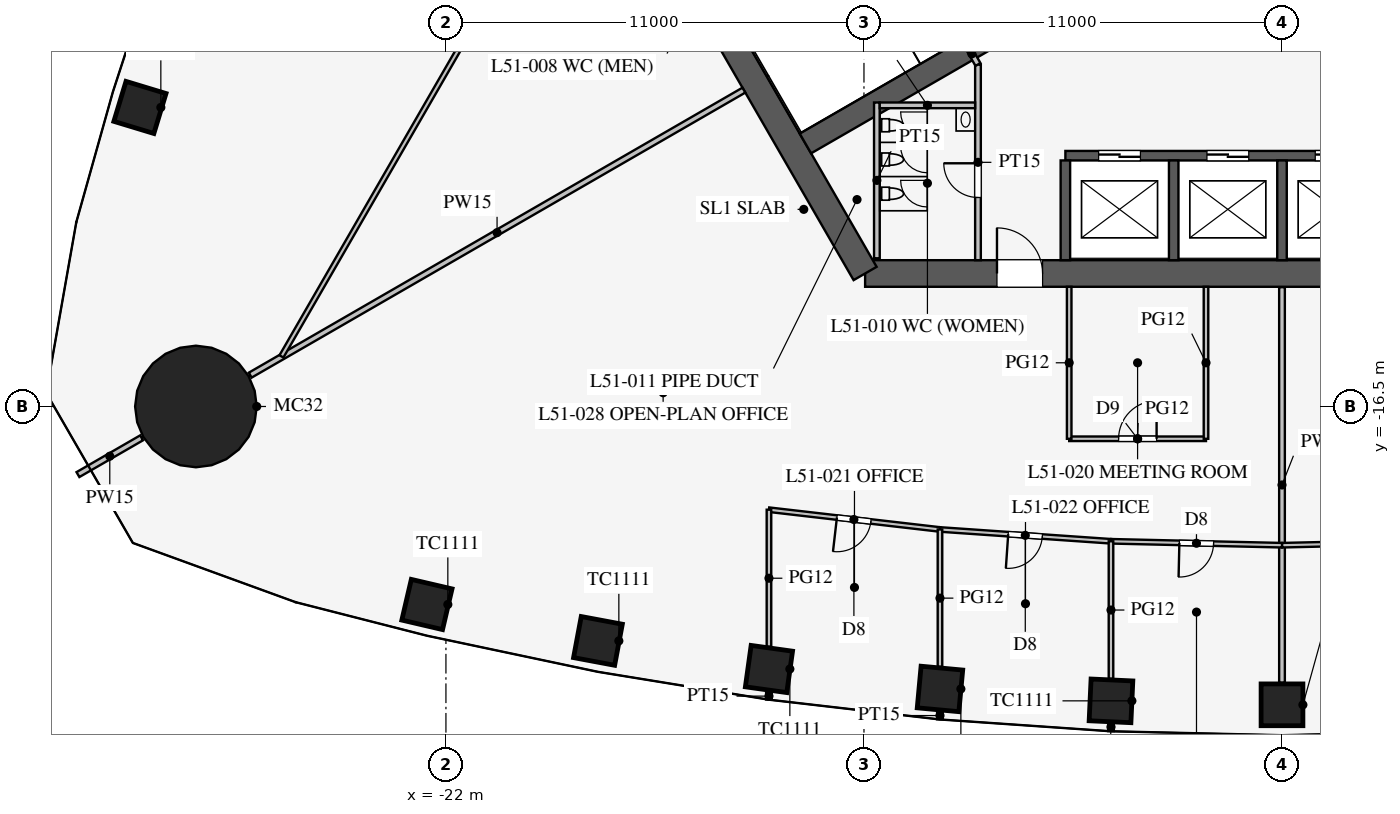
"""IFC4 building model, lengths in metres.
Left out: names, types, materials, properties, quantities, classifications, styles, units other than length and angle.
Written with IfcOpenShell. Run it as: python <this file> out.ifc"""

import sys

from ifc_helpers import new_model, si_unit, direction, frame, frame_2d, origin, origin_2d, place, context, subcontext, project, spatial, rectangle, circle, extrude, element, fill, save


model = new_model("IFC4")
c1 = context("Model", 3, precision=1e-05, world=origin(), true_north=direction((0.0, 1.0)))
c2 = subcontext(c1, "Body", "Model", "MODEL_VIEW")
j1 = project(units=[si_unit("LENGTHUNIT", "METRE"), si_unit("PLANEANGLEUNIT", "RADIAN")], contexts=[c1])
p1 = place(None, origin())
s1 = spatial("IfcSite", under=j1, at=p1, CompositionType="ELEMENT")
p2 = place(p1, origin())
s2 = spatial("IfcBuilding", under=s1, at=p2, CompositionType="ELEMENT")
p3 = place(p2, frame((0.0, 0.0, 223.3)))
s3 = spatial("IfcBuildingStorey", under=s2, at=p3, CompositionType="ELEMENT", Elevation=223.3)
for number, where, z_axis, x_axis in (
    (1, (-22.5, -21.71, 0.0), (0.0, 0.0, 1.0), (0.974, -0.227, 0.0)),
    (2, (-18.0, -22.669, 0.0), (0.0, 0.0, 1.0), (0.983, -0.184, 0.0)),
    (3, (-13.5, -23.408, 0.0), (0.0, 0.0, 1.0), (0.99, -0.138, 0.0)),
    (4, (-9.0, -23.933, 0.0), (0.0, 0.0, 1.0), (0.996, -0.092, 0.0)),
    (5, (-4.5, -24.246, 0.0), (0.0, 0.0, 1.0), (0.999, -0.046, 0.0)),
    (6, (0.0, -24.351, 0.0), (0.0, 0.0, 1.0), (1.0, 0.0, 0.0)),
    (7, (-30.052, -8.63, 0.0), (0.0, 0.0, 1.0), (-0.29, -0.957, 0.0)),
):
    element("IfcColumn", number, at=place(p3, frame(where, z_axis=z_axis, x_axis=x_axis)), inside=s3, PredefinedType="COLUMN", context=c2, shape_type="SweptSolid", body=[
        extrude(rectangle(XDim=1.1, YDim=1.1, at=origin_2d()), origin(), (0.0, 0.0, 1.0), 4.2),
    ])
p4 = place(p3, frame((-28.579, -16.5, 0.0), z_axis=(0.0, 0.0, 1.0), x_axis=(1.0, 0.0, 0.0)))
e8 = element("IfcColumn", 8, at=p4, inside=s3, PredefinedType="COLUMN", context=c2, shape_type="SweptSolid", body=[
    extrude(circle(Radius=1.6, at=origin_2d()), origin(), (0.0, 0.0, 1.0), 4.2),
])
p5 = place(p3, frame((-10.97, -13.0, 0.0), z_axis=(0.0, 0.0, 1.0), x_axis=(1.0, 0.0, 0.0)))
e9 = element("IfcWall", 9, at=p5, inside=s3, PredefinedType="SHEAR", context=c2, shape_type="SweptSolid", body=[
    extrude(rectangle(XDim=21.939, YDim=0.7, at=frame_2d((10.97, 0.0))), origin(), (0.0, 0.0, 1.0), 4.2),
])
p6 = place(p5, frame((17.27, 0.0, 0.0)))
e10 = element("IfcOpeningElement", 10, at=p6, cuts=e9, PredefinedType="OPENING", context=c2, shape_type="SweptSolid", body=[
    extrude(rectangle(XDim=1.2, YDim=2.1, at=frame_2d((0.6, 1.05))), frame((0.0, 0.36, 0.0), z_axis=(0.0, -1.0, 0.0), x_axis=(1.0, 0.0, 0.0)), (0.0, 0.0, 1.0), 0.72),
])
p7 = place(p5, frame((3.47, 0.0, 0.0)))
e11 = element("IfcOpeningElement", 11, at=p7, cuts=e9, PredefinedType="OPENING", context=c2, shape_type="SweptSolid", body=[
    extrude(rectangle(XDim=1.2, YDim=2.1, at=frame_2d((0.6, 1.05))), frame((0.0, 0.36, 0.0), z_axis=(0.0, -1.0, 0.0), x_axis=(1.0, 0.0, 0.0)), (0.0, 0.0, 1.0), 0.72),
])
p8 = place(p3, frame((-16.743, -3.0, 0.0), z_axis=(0.0, 0.0, 1.0), x_axis=(0.499995765644, -0.866027848477, 0.0)))
e12 = element("IfcWall", 12, at=p8, inside=s3, PredefinedType="SHEAR", context=c2, shape_type="SweptSolid", body=[
    extrude(rectangle(XDim=11.547, YDim=0.7, at=frame_2d((5.773, 0.0))), origin(), (0.0, 0.0, 1.0), 4.2),
])
p9 = place(p3, frame((-5.7, -9.9, 0.0), z_axis=(0.0, 0.0, 1.0), x_axis=(1.0, 0.0, 0.0)))
e13 = element("IfcWall", 13, at=p9, inside=s3, PredefinedType="SHEAR", context=c2, shape_type="SweptSolid", body=[
    extrude(rectangle(XDim=11.4, YDim=0.25, at=frame_2d((5.7, 0.0))), origin(), (0.0, 0.0, 1.0), 4.2),
])
p10 = place(p9, frame((0.875, 0.0, 0.0)))
e14 = element("IfcOpeningElement", 14, at=p10, cuts=e13, PredefinedType="OPENING", context=c2, shape_type="SweptSolid", body=[
    extrude(rectangle(XDim=1.1, YDim=2.2, at=frame_2d((0.55, 1.1))), frame((0.0, 0.135, 0.0), z_axis=(0.0, -1.0, 0.0), x_axis=(1.0, 0.0, 0.0)), (0.0, 0.0, 1.0), 0.27),
])
p11 = place(p9, frame((3.725, 0.0, 0.0)))
e15 = element("IfcOpeningElement", 15, at=p11, cuts=e13, PredefinedType="OPENING", context=c2, shape_type="SweptSolid", body=[
    extrude(rectangle(XDim=1.1, YDim=2.2, at=frame_2d((0.55, 1.1))), frame((0.0, 0.135, 0.0), z_axis=(0.0, -1.0, 0.0), x_axis=(1.0, 0.0, 0.0)), (0.0, 0.0, 1.0), 0.27),
])
p12 = place(p9, frame((6.575, 0.0, 0.0)))
e16 = element("IfcOpeningElement", 16, at=p12, cuts=e13, PredefinedType="OPENING", context=c2, shape_type="SweptSolid", body=[
    extrude(rectangle(XDim=1.1, YDim=2.2, at=frame_2d((0.55, 1.1))), frame((0.0, 0.135, 0.0), z_axis=(0.0, -1.0, 0.0), x_axis=(1.0, 0.0, 0.0)), (0.0, 0.0, 1.0), 0.27),
])
p13 = place(p9, frame((9.425, 0.0, 0.0)))
e17 = element("IfcOpeningElement", 17, at=p13, cuts=e13, PredefinedType="OPENING", context=c2, shape_type="SweptSolid", body=[
    extrude(rectangle(XDim=1.1, YDim=2.2, at=frame_2d((0.55, 1.1))), frame((0.0, 0.135, 0.0), z_axis=(0.0, -1.0, 0.0), x_axis=(1.0, 0.0, 0.0)), (0.0, 0.0, 1.0), 0.27),
])
for number, where, z_axis, x_axis in (
    (18, (-5.7, -10.025, 0.0), (0.0, 0.0, 1.0), (0.0, -1.0, 0.0)),
    (19, (-2.85, -10.025, 0.0), (0.0, 0.0, 1.0), (0.0, -1.0, 0.0)),
    (20, (0.0, -10.025, 0.0), (0.0, 0.0, 1.0), (0.0, -1.0, 0.0)),
):
    element("IfcWall", number, at=place(p3, frame(where, z_axis=z_axis, x_axis=x_axis)), inside=s3, PredefinedType="SHEAR", context=c2, shape_type="SweptSolid", body=[
        extrude(rectangle(XDim=2.625, YDim=0.25, at=frame_2d((1.312, 0.0))), origin(), (0.0, 0.0, 1.0), 4.2),
    ])
p14 = place(p3, frame((-4.638, -5.016, 0.0), z_axis=(0.0, 0.0, 1.0), x_axis=(-0.866021621257, -0.500006551472, 0.0)))
e21 = element("IfcWall", 21, at=p14, inside=s3, PredefinedType="SHEAR", context=c2, shape_type="SweptSolid", body=[
    extrude(rectangle(XDim=9.125, YDim=0.6, at=frame_2d((4.562, 0.0))), origin(), (0.0, 0.0, 1.0), 4.2),
])
p15 = place(p3, frame((-8.0, -7.5, 0.0), z_axis=(0.0, 0.0, 1.0), x_axis=(0.0, -1.0, 0.0)))
e22 = element("IfcWall", 22, at=p15, inside=s3, PredefinedType="PARTITIONING", context=c2, shape_type="SweptSolid", body=[
    extrude(rectangle(XDim=5.15, YDim=0.15, at=frame_2d((2.575, 0.0))), origin(), (0.0, 0.0, 1.0), 4.0),
])
p16 = place(p15, frame((2.6, 0.0, 0.0)))
e23 = element("IfcOpeningElement", 23, at=p16, cuts=e22, PredefinedType="OPENING", context=c2, shape_type="SweptSolid", body=[
    extrude(rectangle(XDim=0.9, YDim=2.1, at=frame_2d((0.45, 1.05))), frame((0.0, 0.085, 0.0), z_axis=(0.0, -1.0, 0.0), x_axis=(1.0, 0.0, 0.0)), (0.0, 0.0, 1.0), 0.17),
])
p17 = place(p3, frame((-8.0, -7.5, 0.0), z_axis=(0.0, 0.0, 1.0), x_axis=(-0.499842556608, 0.866116284689, 0.0)))
e24 = element("IfcWall", 24, at=p17, inside=s3, PredefinedType="PARTITIONING", context=c2, shape_type="SweptSolid", body=[
    extrude(rectangle(XDim=0.645, YDim=0.15, at=frame_2d((0.323, 0.0))), origin(), (0.0, 0.0, 1.0), 4.0),
])
p18 = place(p3, frame((-10.66, -8.5, 0.0), z_axis=(0.0, 0.0, 1.0), x_axis=(0.0, -1.0, 0.0)))
e25 = element("IfcWall", 25, at=p18, inside=s3, PredefinedType="PARTITIONING", context=c2, shape_type="SweptSolid", body=[
    extrude(rectangle(XDim=4.1, YDim=0.15, at=frame_2d((2.05, 0.0))), origin(), (0.0, 0.0, 1.0), 4.0),
])
p19 = place(p3, frame((-8.075, -8.575, 0.0), z_axis=(0.0, 0.0, 1.0), x_axis=(-1.0, 0.0, 0.0)))
e26 = element("IfcWall", 26, at=p19, inside=s3, PredefinedType="PARTITIONING", context=c2, shape_type="SweptSolid", body=[
    extrude(rectangle(XDim=2.51, YDim=0.15, at=frame_2d((1.255, 0.0))), origin(), (0.0, 0.0, 1.0), 4.0),
])
p20 = place(p3, frame((-14.159, -8.175, 0.0), z_axis=(0.0, 0.0, 1.0), x_axis=(-0.866027028085, -0.499997186618, 0.0)))
e27 = element("IfcWall", 27, at=p20, inside=s3, PredefinedType="PARTITIONING", context=c2, shape_type="SweptSolid", body=[
    extrude(rectangle(XDim=15.0, YDim=0.15, at=frame_2d((7.5, 0.0))), origin(), (0.0, 0.0, 1.0), 2.4),
])
p21 = place(p3, frame((-30.008, -17.325, 0.0), z_axis=(0.0, 0.0, 1.0), x_axis=(-0.866013246922, -0.500021055713, 0.0)))
e28 = element("IfcWall", 28, at=p21, inside=s3, PredefinedType="PARTITIONING", context=c2, shape_type="SweptSolid", body=[
    extrude(rectangle(XDim=1.935, YDim=0.15, at=frame_2d((0.967, 0.0))), origin(), (0.0, 0.0, 1.0), 2.4),
])
p22 = place(p3, frame((0.0, -13.36, 0.0), z_axis=(0.0, 0.0, 1.0), x_axis=(0.0, -1.0, 0.0)))
e29 = element("IfcWall", 29, at=p22, inside=s3, PredefinedType="PARTITIONING", context=c2, shape_type="SweptSolid", body=[
    extrude(rectangle(XDim=10.411, YDim=0.15, at=frame_2d((5.205, 0.0))), origin(), (0.0, 0.0, 1.0), 3.3),
])
p23 = place(p3, frame((-5.6, -17.35, 0.0), z_axis=(0.0, 0.0, 1.0), x_axis=(1.0, 0.0, 0.0)))
e30 = element("IfcWall", 30, at=p23, inside=s3, PredefinedType="PARTITIONING", context=c2, shape_type="SweptSolid", body=[
    extrude(rectangle(XDim=3.6, YDim=0.12, at=frame_2d((1.8, 0.0))), origin(), (0.0, 0.0, 1.0), 2.9),
])
p24 = place(p23, frame((1.3, 0.0, 0.15)))
e31 = element("IfcOpeningElement", 31, at=p24, cuts=e30, PredefinedType="OPENING", context=c2, shape_type="SweptSolid", body=[
    extrude(rectangle(XDim=1.0, YDim=2.1, at=frame_2d((0.5, 1.05))), frame((0.0, 0.07, 0.0), z_axis=(0.0, -1.0, 0.0), x_axis=(1.0, 0.0, 0.0)), (0.0, 0.0, 1.0), 0.14),
])
for number, where, z_axis, x_axis in (
    (32, (-2.0, -13.35, 0.0), (0.0, 0.0, 1.0), (0.0, -1.0, 0.0)),
    (33, (-5.6, -13.35, 0.0), (0.0, 0.0, 1.0), (0.0, -1.0, 0.0)),
):
    element("IfcWall", number, at=place(p3, frame(where, z_axis=z_axis, x_axis=x_axis)), inside=s3, PredefinedType="PARTITIONING", context=c2, shape_type="SweptSolid", body=[
        extrude(rectangle(XDim=4.0, YDim=0.12, at=frame_2d((2.0, 0.0))), origin(), (0.0, 0.0, 1.0), 2.9),
    ])
p25 = place(p3, frame((-13.5, -24.033, 0.0), z_axis=(0.0, 0.0, 1.0), x_axis=(0.0, -1.0, 0.0)))
e34 = element("IfcWall", 34, at=p25, inside=s3, PredefinedType="PARTITIONING", context=c2, shape_type="SweptSolid", body=[
    extrude(rectangle(XDim=0.178, YDim=0.15, at=frame_2d((0.089, 0.0))), origin(), (0.0, 0.0, 1.0), 2.9),
])
p26 = place(p3, frame((-4.5, -24.825, 0.0), z_axis=(0.0, 0.0, 1.0), x_axis=(0.0, -1.0, 0.0)))
e35 = element("IfcWall", 35, at=p26, inside=s3, PredefinedType="PARTITIONING", context=c2, shape_type="SweptSolid", body=[
    extrude(rectangle(XDim=0.217, YDim=0.15, at=frame_2d((0.108, 0.0))), origin(), (0.0, 0.0, 1.0), 2.9),
])
p27 = place(p3, frame((-9.0, -24.535, 0.0), z_axis=(0.0, 0.0, 1.0), x_axis=(0.0, -1.0, 0.0)))
e36 = element("IfcWall", 36, at=p27, inside=s3, PredefinedType="PARTITIONING", context=c2, shape_type="SweptSolid", body=[
    extrude(rectangle(XDim=0.196, YDim=0.15, at=frame_2d((0.098, 0.0))), origin(), (0.0, 0.0, 1.0), 2.9),
])
p28 = place(p3, frame((0.0, -20.151, 0.0), z_axis=(0.0, 0.0, 1.0), x_axis=(0.99973552509, 0.022997388381, 0.0)))
e37 = element("IfcWall", 37, at=p28, inside=s3, PredefinedType="PARTITIONING", context=c2, shape_type="SweptSolid", body=[
    extrude(rectangle(XDim=4.501, YDim=0.12, at=frame_2d((2.25, 0.0))), origin(), (0.0, 0.0, 1.0), 2.9),
])
p29 = place(p28, frame((1.8, 0.0, 0.15)))
e38 = element("IfcOpeningElement", 38, at=p29, cuts=e37, PredefinedType="OPENING", context=c2, shape_type="SweptSolid", body=[
    extrude(rectangle(XDim=0.9, YDim=2.1, at=frame_2d((0.45, 1.05))), frame((0.0, 0.07, 0.0), z_axis=(0.0, -1.0, 0.0), x_axis=(1.0, 0.0, 0.0)), (0.0, 0.0, 1.0), 0.14),
])
p30 = place(p3, frame((-13.5, -19.216, 0.0), z_axis=(0.0, 0.0, 1.0), x_axis=(0.993382946625, -0.114849124309, 0.0)))
e39 = element("IfcWall", 39, at=p30, inside=s3, PredefinedType="PARTITIONING", context=c2, shape_type="SweptSolid", body=[
    extrude(rectangle(XDim=4.53, YDim=0.12, at=frame_2d((2.265, 0.0))), origin(), (0.0, 0.0, 1.0), 2.9),
])
p31 = place(p30, frame((1.8, 0.0, 0.15)))
e40 = element("IfcOpeningElement", 40, at=p31, cuts=e39, PredefinedType="OPENING", context=c2, shape_type="SweptSolid", body=[
    extrude(rectangle(XDim=0.9, YDim=2.1, at=frame_2d((0.45, 1.05))), frame((0.0, 0.07, 0.0), z_axis=(0.0, -1.0, 0.0), x_axis=(1.0, 0.0, 0.0)), (0.0, 0.0, 1.0), 0.14),
])
p32 = place(p3, frame((-4.5, -20.047, 0.0), z_axis=(0.0, 0.0, 1.0), x_axis=(0.99973552509, -0.022997388381, 0.0)))
e41 = element("IfcWall", 41, at=p32, inside=s3, PredefinedType="PARTITIONING", context=c2, shape_type="SweptSolid", body=[
    extrude(rectangle(XDim=4.501, YDim=0.12, at=frame_2d((2.25, 0.0))), origin(), (0.0, 0.0, 1.0), 2.9),
])
p33 = place(p32, frame((1.8, 0.0, 0.15)))
e42 = element("IfcOpeningElement", 42, at=p33, cuts=e41, PredefinedType="OPENING", context=c2, shape_type="SweptSolid", body=[
    extrude(rectangle(XDim=0.9, YDim=2.1, at=frame_2d((0.45, 1.05))), frame((0.0, 0.07, 0.0), z_axis=(0.0, -1.0, 0.0), x_axis=(1.0, 0.0, 0.0)), (0.0, 0.0, 1.0), 0.14),
])
p34 = place(p3, frame((-9.0, -19.736, 0.0), z_axis=(0.0, 0.0, 1.0), x_axis=(0.997623533978, -0.068900540297, 0.0)))
e43 = element("IfcWall", 43, at=p34, inside=s3, PredefinedType="PARTITIONING", context=c2, shape_type="SweptSolid", body=[
    extrude(rectangle(XDim=4.511, YDim=0.12, at=frame_2d((2.255, 0.0))), origin(), (0.0, 0.0, 1.0), 2.9),
])
p35 = place(p34, frame((1.8, 0.0, 0.15)))
e44 = element("IfcOpeningElement", 44, at=p35, cuts=e43, PredefinedType="OPENING", context=c2, shape_type="SweptSolid", body=[
    extrude(rectangle(XDim=0.9, YDim=2.1, at=frame_2d((0.45, 1.05))), frame((0.0, 0.07, 0.0), z_axis=(0.0, -1.0, 0.0), x_axis=(1.0, 0.0, 0.0)), (0.0, 0.0, 1.0), 0.14),
])
p36 = place(p3, frame((-13.5, -19.216, 0.0), z_axis=(0.0, 0.0, 1.0), x_axis=(0.0, -1.0, 0.0)))
e45 = element("IfcWall", 45, at=p36, inside=s3, PredefinedType="PARTITIONING", context=c2, shape_type="SweptSolid", body=[
    extrude(rectangle(XDim=3.607, YDim=0.12, at=frame_2d((1.803, 0.0))), origin(), (0.0, 0.0, 1.0), 2.9),
])
p37 = place(p3, frame((-4.5, -20.047, 0.0), z_axis=(0.0, 0.0, 1.0), x_axis=(0.0, -1.0, 0.0)))
e46 = element("IfcWall", 46, at=p37, inside=s3, PredefinedType="PARTITIONING", context=c2, shape_type="SweptSolid", body=[
    extrude(rectangle(XDim=3.619, YDim=0.12, at=frame_2d((1.809, 0.0))), origin(), (0.0, 0.0, 1.0), 2.9),
])
p38 = place(p3, frame((-9.0, -19.736, 0.0), z_axis=(0.0, 0.0, 1.0), x_axis=(0.0, -1.0, 0.0)))
e47 = element("IfcWall", 47, at=p38, inside=s3, PredefinedType="PARTITIONING", context=c2, shape_type="SweptSolid", body=[
    extrude(rectangle(XDim=3.614, YDim=0.12, at=frame_2d((1.807, 0.0))), origin(), (0.0, 0.0, 1.0), 2.9),
])
p39 = place(p3, frame((-0.016, 30.392, 0.0), z_axis=(0.0, 0.0, 1.0), x_axis=(-0.500000626146, -0.866025042278, 0.0)))
e48 = element("IfcWall", 48, at=p39, inside=s3, PredefinedType="PARTITIONING", context=c2, shape_type="SweptSolid", body=[
    extrude(rectangle(XDim=52.624, YDim=0.12, at=frame_2d((26.312, 0.0))), origin(), (0.0, 0.0, 1.0), 2.9),
])
p40 = place(p39, frame((10.15, 0.0, 0.15)))
e49 = element("IfcOpeningElement", 49, at=p40, cuts=e48, PredefinedType="OPENING", context=c2, shape_type="SweptSolid", body=[
    extrude(rectangle(XDim=1.8, YDim=2.1, at=frame_2d((0.9, 1.05))), frame((0.0, 0.07, 0.0), z_axis=(0.0, -1.0, 0.0), x_axis=(1.0, 0.0, 0.0)), (0.0, 0.0, 1.0), 0.14),
])
p41 = place(p39, frame((40.65, 0.0, 0.15)))
e50 = element("IfcOpeningElement", 50, at=p41, cuts=e48, PredefinedType="OPENING", context=c2, shape_type="SweptSolid", body=[
    extrude(rectangle(XDim=1.8, YDim=2.1, at=frame_2d((0.9, 1.05))), frame((0.0, 0.07, 0.0), z_axis=(0.0, -1.0, 0.0), x_axis=(1.0, 0.0, 0.0)), (0.0, 0.0, 1.0), 0.14),
])
p42 = place(p16, frame((0.9, 0.0, 0.0), z_axis=(0.0, 0.0, 1.0), x_axis=(-1.0, 0.0, 0.0)))
e51 = element("IfcDoor", 51, at=p42, inside=s3, OperationType="SINGLE_SWING_RIGHT", PredefinedType="DOOR", context=c2, shape_type="SweptSolid", body=[
    extrude(rectangle(XDim=0.9, YDim=2.1, at=frame_2d((0.45, 1.05))), frame((0.0, 0.025, 0.0), z_axis=(0.0, -1.0, 0.0), x_axis=(1.0, 0.0, 0.0)), (0.0, 0.0, 1.0), 0.05),
])
fill(e23, e51)
p43 = place(p7, origin())
e52 = element("IfcDoor", 52, at=p43, inside=s3, OperationType="SINGLE_SWING_LEFT", PredefinedType="DOOR", context=c2, shape_type="SweptSolid", body=[
    extrude(rectangle(XDim=1.2, YDim=2.1, at=frame_2d((0.6, 1.05))), frame((0.0, 0.025, 0.0), z_axis=(0.0, -1.0, 0.0), x_axis=(1.0, 0.0, 0.0)), (0.0, 0.0, 1.0), 0.05),
])
fill(e11, e52)
p44 = place(p24, origin())
e53 = element("IfcDoor", 53, at=p44, inside=s3, OperationType="SINGLE_SWING_RIGHT", PredefinedType="DOOR", context=c2, shape_type="SweptSolid", body=[
    extrude(rectangle(XDim=1.0, YDim=2.1, at=frame_2d((0.5, 1.05))), frame((0.0, 0.025, 0.0), z_axis=(0.0, -1.0, 0.0), x_axis=(1.0, 0.0, 0.0)), (0.0, 0.0, 1.0), 0.05),
])
fill(e31, e53)
p45 = place(p31, frame((0.9, 0.0, 0.0), z_axis=(0.0, 0.0, 1.0), x_axis=(-1.0, 0.0, 0.0)))
e54 = element("IfcDoor", 54, at=p45, inside=s3, OperationType="SINGLE_SWING_RIGHT", PredefinedType="DOOR", context=c2, shape_type="SweptSolid", body=[
    extrude(rectangle(XDim=0.9, YDim=2.1, at=frame_2d((0.45, 1.05))), frame((0.0, 0.025, 0.0), z_axis=(0.0, -1.0, 0.0), x_axis=(1.0, 0.0, 0.0)), (0.0, 0.0, 1.0), 0.05),
])
fill(e40, e54)
p46 = place(p35, frame((0.9, 0.0, 0.0), z_axis=(0.0, 0.0, 1.0), x_axis=(-1.0, 0.0, 0.0)))
e55 = element("IfcDoor", 55, at=p46, inside=s3, OperationType="SINGLE_SWING_RIGHT", PredefinedType="DOOR", context=c2, shape_type="SweptSolid", body=[
    extrude(rectangle(XDim=0.9, YDim=2.1, at=frame_2d((0.45, 1.05))), frame((0.0, 0.025, 0.0), z_axis=(0.0, -1.0, 0.0), x_axis=(1.0, 0.0, 0.0)), (0.0, 0.0, 1.0), 0.05),
])
fill(e44, e55)
p47 = place(p33, frame((0.9, 0.0, 0.0), z_axis=(0.0, 0.0, 1.0), x_axis=(-1.0, 0.0, 0.0)))
e56 = element("IfcDoor", 56, at=p47, inside=s3, OperationType="SINGLE_SWING_RIGHT", PredefinedType="DOOR", context=c2, shape_type="SweptSolid", body=[
    extrude(rectangle(XDim=0.9, YDim=2.1, at=frame_2d((0.45, 1.05))), frame((0.0, 0.025, 0.0), z_axis=(0.0, -1.0, 0.0), x_axis=(1.0, 0.0, 0.0)), (0.0, 0.0, 1.0), 0.05),
])
fill(e42, e56)
p48 = place(p10, origin())
e57 = element("IfcDoor", 57, at=p48, inside=s3, OperationType="DOUBLE_DOOR_SLIDING", PredefinedType="DOOR", context=c2, shape_type="SweptSolid", body=[
    extrude(rectangle(XDim=1.1, YDim=2.2, at=frame_2d((0.55, 1.1))), frame((0.0, 0.025, 0.0), z_axis=(0.0, -1.0, 0.0), x_axis=(1.0, 0.0, 0.0)), (0.0, 0.0, 1.0), 0.05),
])
fill(e14, e57)
p49 = place(p11, origin())
e58 = element("IfcDoor", 58, at=p49, inside=s3, OperationType="DOUBLE_DOOR_SLIDING", PredefinedType="DOOR", context=c2, shape_type="SweptSolid", body=[
    extrude(rectangle(XDim=1.1, YDim=2.2, at=frame_2d((0.55, 1.1))), frame((0.0, 0.025, 0.0), z_axis=(0.0, -1.0, 0.0), x_axis=(1.0, 0.0, 0.0)), (0.0, 0.0, 1.0), 0.05),
])
fill(e15, e58)
p50 = place(p12, origin())
e59 = element("IfcDoor", 59, at=p50, inside=s3, OperationType="DOUBLE_DOOR_SLIDING", PredefinedType="DOOR", context=c2, shape_type="SweptSolid", body=[
    extrude(rectangle(XDim=1.1, YDim=2.2, at=frame_2d((0.55, 1.1))), frame((0.0, 0.025, 0.0), z_axis=(0.0, -1.0, 0.0), x_axis=(1.0, 0.0, 0.0)), (0.0, 0.0, 1.0), 0.05),
])
fill(e16, e59)
save(model, sys.argv[1])
